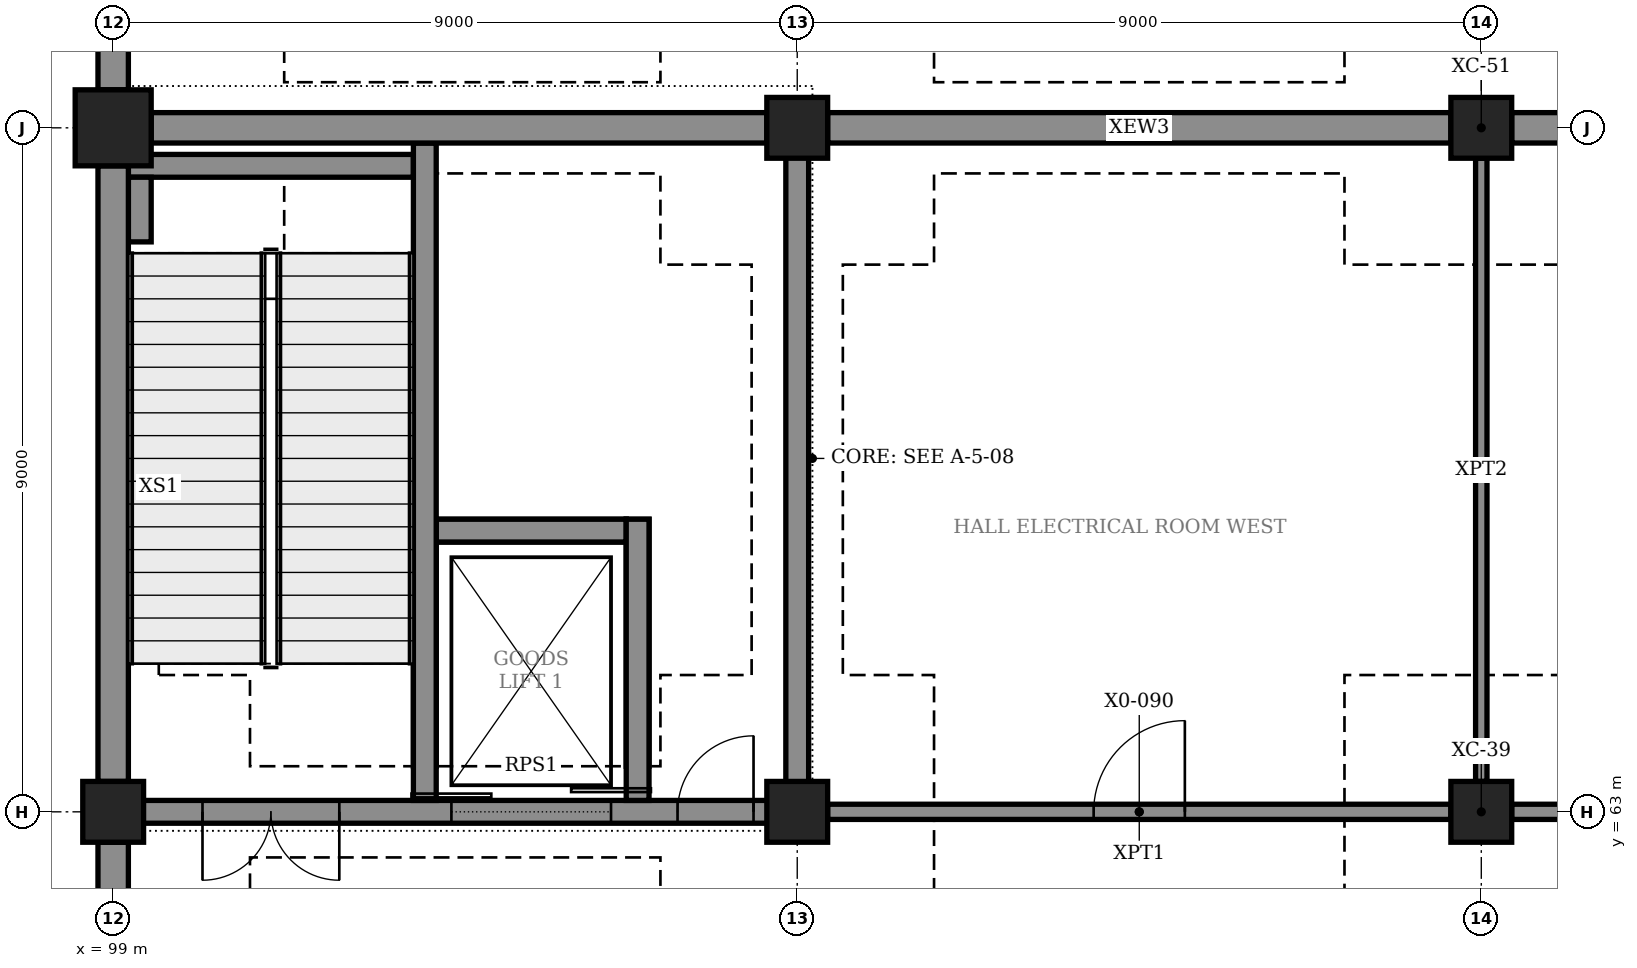
"""IFC4 building model, lengths in metres.
Left out: names, types, materials, properties, quantities, classifications, styles, units other than length and angle.
Written with IfcOpenShell. Run it as: python <this file> out.ifc"""

import sys

from ifc_helpers import new_model, si_unit, direction, frame, frame_2d, origin, origin_2d, place, context, subcontext, project, spatial, rectangle, hollow_rectangle, extrude, element, fill, save


model = new_model("IFC4")
c1 = context("Model", 3, precision=1e-05, world=origin(), true_north=direction((0.0, 1.0)))
c2 = subcontext(c1, "Body", "Model", "MODEL_VIEW")
j1 = project(units=[si_unit("LENGTHUNIT", "METRE"), si_unit("PLANEANGLEUNIT", "RADIAN")], contexts=[c1])
p1 = place(None, origin())
s1 = spatial("IfcSite", under=j1, at=p1, CompositionType="ELEMENT")
p2 = place(p1, origin())
s2 = spatial("IfcBuilding", under=s1, at=p2, CompositionType="ELEMENT")
p3 = place(p2, origin())
s3 = spatial("IfcBuildingStorey", under=s2, at=p3, CompositionType="ELEMENT", Elevation=0.0)
p4 = place(p3, frame((99.0, 72.0, 0.0), z_axis=(0.0, 0.0, 1.0), x_axis=(1.0, 0.0, 0.0)))
e1 = element("IfcColumn", 1, at=p4, inside=s3, PredefinedType="COLUMN", context=c2, shape_type="SweptSolid", body=[
    extrude(hollow_rectangle(XDim=1.0, YDim=1.0, WallThickness=0.032, at=origin_2d()), origin(), (0.0, 0.0, 1.0), 6.0),
])
for number, where, z_axis, x_axis in (
    (2, (99.0, 63.0, 0.0), (0.0, 0.0, 1.0), (1.0, 0.0, 0.0)),
    (3, (108.0, 63.0, 0.0), (0.0, 0.0, 1.0), (1.0, 0.0, 0.0)),
    (4, (117.0, 63.0, 0.0), (0.0, 0.0, 1.0), (1.0, 0.0, 0.0)),
    (5, (108.0, 72.0, 0.0), (0.0, 0.0, 1.0), (1.0, 0.0, 0.0)),
    (6, (117.0, 72.0, 0.0), (0.0, 0.0, 1.0), (1.0, 0.0, 0.0)),
):
    element("IfcColumn", number, at=place(p3, frame(where, z_axis=z_axis, x_axis=x_axis)), inside=s3, PredefinedType="COLUMN", context=c2, shape_type="SweptSolid", body=[
        extrude(rectangle(XDim=0.8, YDim=0.8, at=origin_2d()), origin(), (0.0, 0.0, 1.0), 6.0),
    ])
p5 = place(p3, frame((99.2, 63.0, 0.0), z_axis=(0.0, 0.0, 1.0), x_axis=(1.0, 0.0, 0.0)))
e7 = element("IfcWall", 7, at=p5, inside=s3, PredefinedType="SHEAR", context=c2, shape_type="SweptSolid", body=[
    extrude(rectangle(XDim=8.95, YDim=0.3, at=frame_2d((4.475, 0.0))), origin(), (0.0, 0.0, 1.0), 6.0),
])
p6 = place(p5, frame((0.975, 0.0, 0.0)))
e8 = element("IfcOpeningElement", 8, at=p6, cuts=e7, PredefinedType="OPENING", context=c2, shape_type="SweptSolid", body=[
    extrude(rectangle(XDim=1.8, YDim=2.4, at=frame_2d((0.9, 1.2))), frame((0.0, 0.16, 0.0), z_axis=(0.0, -1.0, 0.0), x_axis=(1.0, 0.0, 0.0)), (0.0, 0.0, 1.0), 0.32),
])
p7 = place(p5, frame((4.25, 0.0, 0.0)))
e9 = element("IfcOpeningElement", 9, at=p7, cuts=e7, PredefinedType="OPENING", context=c2, shape_type="SweptSolid", body=[
    extrude(rectangle(XDim=2.1, YDim=2.4, at=frame_2d((1.05, 1.2))), frame((0.0, 0.16, 0.0), z_axis=(0.0, -1.0, 0.0), x_axis=(1.0, 0.0, 0.0)), (0.0, 0.0, 1.0), 0.32),
])
p8 = place(p5, frame((7.225, 0.0, 0.0)))
e10 = element("IfcOpeningElement", 10, at=p8, cuts=e7, PredefinedType="OPENING", context=c2, shape_type="SweptSolid", body=[
    extrude(rectangle(XDim=1.0, YDim=2.4, at=frame_2d((0.5, 1.2))), frame((0.0, 0.16, 0.0), z_axis=(0.0, -1.0, 0.0), x_axis=(1.0, 0.0, 0.0)), (0.0, 0.0, 1.0), 0.32),
])
p9 = place(p3, frame((108.0, 63.15, 0.0), z_axis=(0.0, 0.0, 1.0), x_axis=(0.0, 1.0, 0.0)))
e11 = element("IfcWall", 11, at=p9, inside=s3, PredefinedType="SHEAR", context=c2, shape_type="SweptSolid", body=[
    extrude(rectangle(XDim=8.65, YDim=0.3, at=frame_2d((4.325, 0.0))), origin(), (0.0, 0.0, 1.0), 6.0),
])
p10 = place(p3, frame((99.0, 54.5, 0.0), z_axis=(0.0, 0.0, 1.0), x_axis=(0.0, 1.0, 0.0)))
e12 = element("IfcWall", 12, at=p10, inside=s3, PredefinedType="SOLIDWALL", context=c2, shape_type="SweptSolid", body=[
    extrude(rectangle(XDim=8.1, YDim=0.4, at=frame_2d((4.05, 0.0))), origin(), (0.0, 0.0, 1.0), 4.92),
])
p11 = place(p10, frame((2.95, 0.0, 0.0)))
e13 = element("IfcOpeningElement", 13, at=p11, cuts=e12, PredefinedType="OPENING", context=c2, shape_type="SweptSolid", body=[
    extrude(rectangle(XDim=2.1, YDim=2.4, at=frame_2d((1.05, 1.2))), frame((0.0, 0.21, 0.0), z_axis=(0.0, -1.0, 0.0), x_axis=(1.0, 0.0, 0.0)), (0.0, 0.0, 1.0), 0.42),
])
p12 = place(p3, frame((99.0, 63.4, 0.0), z_axis=(0.0, 0.0, 1.0), x_axis=(0.0, 1.0, 0.0)))
e14 = element("IfcWall", 14, at=p12, inside=s3, PredefinedType="SOLIDWALL", context=c2, shape_type="SweptSolid", body=[
    extrude(rectangle(XDim=8.1, YDim=0.4, at=frame_2d((4.05, 0.0))), origin(), (0.0, 0.0, 1.0), 4.92),
])
p13 = place(p3, frame((99.0, 72.5, 0.0), z_axis=(0.0, 0.0, 1.0), x_axis=(0.0, 1.0, 0.0)))
e15 = element("IfcWall", 15, at=p13, inside=s3, PredefinedType="SOLIDWALL", context=c2, shape_type="SweptSolid", body=[
    extrude(rectangle(XDim=17.0, YDim=0.4, at=frame_2d((8.5, 0.0))), origin(), (0.0, 0.0, 1.0), 6.0),
])
p14 = place(p13, frame((3.15, 0.0, 0.0)))
e16 = element("IfcOpeningElement", 16, at=p14, cuts=e15, PredefinedType="OPENING", context=c2, shape_type="SweptSolid", body=[
    extrude(rectangle(XDim=2.7, YDim=2.4, at=frame_2d((1.35, 1.2))), frame((0.0, 0.21, 0.0), z_axis=(0.0, -1.0, 0.0), x_axis=(1.0, 0.0, 0.0)), (0.0, 0.0, 1.0), 0.42),
])
p15 = place(p13, frame((11.15, 0.0, 0.0)))
e17 = element("IfcOpeningElement", 17, at=p15, cuts=e15, PredefinedType="OPENING", context=c2, shape_type="SweptSolid", body=[
    extrude(rectangle(XDim=2.7, YDim=2.4, at=frame_2d((1.35, 1.2))), frame((0.0, 0.21, 0.0), z_axis=(0.0, -1.0, 0.0), x_axis=(1.0, 0.0, 0.0)), (0.0, 0.0, 1.0), 0.42),
])
p16 = place(p3, frame((99.5, 72.0, 0.0), z_axis=(0.0, 0.0, 1.0), x_axis=(1.0, 0.0, 0.0)))
e18 = element("IfcWall", 18, at=p16, inside=s3, PredefinedType="SOLIDWALL", context=c2, shape_type="SweptSolid", body=[
    extrude(rectangle(XDim=8.1, YDim=0.4, at=frame_2d((4.05, 0.0))), origin(), (0.0, 0.0, 1.0), 4.82),
])
p17 = place(p3, frame((108.4, 72.0, 0.0), z_axis=(0.0, 0.0, 1.0), x_axis=(1.0, 0.0, 0.0)))
e19 = element("IfcWall", 19, at=p17, inside=s3, PredefinedType="SOLIDWALL", context=c2, shape_type="SweptSolid", body=[
    extrude(rectangle(XDim=8.2, YDim=0.4, at=frame_2d((4.1, 0.0))), origin(), (0.0, 0.0, 1.0), 4.82),
])
p18 = place(p3, frame((117.4, 72.0, 0.0), z_axis=(0.0, 0.0, 1.0), x_axis=(1.0, 0.0, 0.0)))
e20 = element("IfcWall", 20, at=p18, inside=s3, PredefinedType="SOLIDWALL", context=c2, shape_type="SweptSolid", body=[
    extrude(rectangle(XDim=8.6, YDim=0.4, at=frame_2d((4.3, 0.0))), origin(), (0.0, 0.0, 1.0), 4.82),
])
p19 = place(p3, frame((99.2, 71.5, 0.0), z_axis=(0.0, 0.0, 1.0), x_axis=(1.0, 0.0, 0.0)))
e21 = element("IfcWall", 21, at=p19, inside=s3, PredefinedType="SHEAR", context=c2, shape_type="SweptSolid", body=[
    extrude(rectangle(XDim=3.75, YDim=0.3, at=frame_2d((1.875, 0.0))), origin(), (0.0, 0.0, 1.0), 2.8),
])
p20 = place(p3, frame((99.35, 70.499, 0.0), z_axis=(0.0, 0.0, 1.0), x_axis=(0.0, 1.0, 0.0)))
e22 = element("IfcWall", 22, at=p20, inside=s3, PredefinedType="SHEAR", context=c2, shape_type="SweptSolid", body=[
    extrude(rectangle(XDim=0.851, YDim=0.3, at=frame_2d((0.425, 0.0))), origin(), (0.0, 0.0, 1.0), 2.8),
])
p21 = place(p3, frame((103.1, 63.15, 0.0), z_axis=(0.0, 0.0, 1.0), x_axis=(0.0, 1.0, 0.0)))
e23 = element("IfcWall", 23, at=p21, inside=s3, PredefinedType="SHEAR", context=c2, shape_type="SweptSolid", body=[
    extrude(rectangle(XDim=8.65, YDim=0.3, at=frame_2d((4.325, 0.0))), origin(), (0.0, 0.0, 1.0), 5.72),
])
p22 = place(p3, frame((105.9, 63.15, 0.0), z_axis=(0.0, 0.0, 1.0), x_axis=(0.0, 1.0, 0.0)))
e24 = element("IfcWall", 24, at=p22, inside=s3, PredefinedType="SHEAR", context=c2, shape_type="SweptSolid", body=[
    extrude(rectangle(XDim=3.7, YDim=0.3, at=frame_2d((1.85, 0.0))), origin(), (0.0, 0.0, 1.0), 5.72),
])
p23 = place(p3, frame((103.25, 66.7, 0.0), z_axis=(0.0, 0.0, 1.0), x_axis=(1.0, 0.0, 0.0)))
e25 = element("IfcWall", 25, at=p23, inside=s3, PredefinedType="SHEAR", context=c2, shape_type="SweptSolid", body=[
    extrude(rectangle(XDim=2.5, YDim=0.3, at=frame_2d((1.25, 0.0))), origin(), (0.0, 0.0, 1.0), 5.72),
])
for number, where, z_axis, x_axis in (
    (26, (103.1, 63.6, -1.4), (0.0, 0.0, 1.0), (0.0, 1.0, 0.0)),
    (27, (105.9, 63.6, -1.4), (0.0, 0.0, 1.0), (0.0, 1.0, 0.0)),
):
    element("IfcWall", number, at=place(p3, frame(where, z_axis=z_axis, x_axis=x_axis)), inside=s3, PredefinedType="SHEAR", context=c2, shape_type="SweptSolid", body=[
        extrude(rectangle(XDim=3.25, YDim=0.3, at=frame_2d((1.625, 0.0))), origin(), (0.0, 0.0, 1.0), 1.4),
    ])
p24 = place(p3, frame((103.25, 66.7, -1.4), z_axis=(0.0, 0.0, 1.0), x_axis=(1.0, 0.0, 0.0)))
e28 = element("IfcWall", 28, at=p24, inside=s3, PredefinedType="SHEAR", context=c2, shape_type="SweptSolid", body=[
    extrude(rectangle(XDim=2.5, YDim=0.3, at=frame_2d((1.25, 0.0))), origin(), (0.0, 0.0, 1.0), 1.4),
])
p25 = place(p3, frame((108.4, 63.0, 0.0), z_axis=(0.0, 0.0, 1.0), x_axis=(1.0, 0.0, 0.0)))
e29 = element("IfcWall", 29, at=p25, inside=s3, PredefinedType="PARTITIONING", context=c2, shape_type="SweptSolid", body=[
    extrude(rectangle(XDim=8.2, YDim=0.2, at=frame_2d((4.1, 0.0))), origin(), (0.0, 0.0, 1.0), 4.82),
])
p26 = place(p25, frame((3.5, 0.0, 0.015)))
e30 = element("IfcOpeningElement", 30, at=p26, cuts=e29, PredefinedType="OPENING", context=c2, shape_type="SweptSolid", body=[
    extrude(rectangle(XDim=1.2, YDim=2.4, at=frame_2d((0.6, 1.2))), frame((0.0, 0.11, 0.0), z_axis=(0.0, -1.0, 0.0), x_axis=(1.0, 0.0, 0.0)), (0.0, 0.0, 1.0), 0.22),
])
p27 = place(p3, frame((117.4, 63.0, 0.0), z_axis=(0.0, 0.0, 1.0), x_axis=(1.0, 0.0, 0.0)))
e31 = element("IfcWall", 31, at=p27, inside=s3, PredefinedType="PARTITIONING", context=c2, shape_type="SweptSolid", body=[
    extrude(rectangle(XDim=8.45, YDim=0.2, at=frame_2d((4.225, 0.0))), origin(), (0.0, 0.0, 1.0), 4.82),
])
p28 = place(p27, frame((3.625, 0.0, 0.015)))
e32 = element("IfcOpeningElement", 32, at=p28, cuts=e31, PredefinedType="OPENING", context=c2, shape_type="SweptSolid", body=[
    extrude(rectangle(XDim=1.2, YDim=2.4, at=frame_2d((0.6, 1.2))), frame((0.0, 0.11, 0.0), z_axis=(0.0, -1.0, 0.0), x_axis=(1.0, 0.0, 0.0)), (0.0, 0.0, 1.0), 0.22),
])
p29 = place(p3, frame((117.0, 63.4, 0.0), z_axis=(0.0, 0.0, 1.0), x_axis=(0.0, 1.0, 0.0)))
e33 = element("IfcWall", 33, at=p29, inside=s3, PredefinedType="PARTITIONING", context=c2, shape_type="SweptSolid", body=[
    extrude(rectangle(XDim=8.2, YDim=0.15, at=frame_2d((4.1, 0.0))), origin(), (0.0, 0.0, 1.0), 4.92),
])
p30 = place(p26, origin())
e34 = element("IfcDoor", 34, at=p30, inside=s3, OperationType="SINGLE_SWING_RIGHT", PredefinedType="DOOR", context=c2, shape_type="SweptSolid", body=[
    extrude(rectangle(XDim=1.2, YDim=2.4, at=frame_2d((0.6, 1.2))), frame((0.0, 0.025, 0.0), z_axis=(0.0, -1.0, 0.0), x_axis=(1.0, 0.0, 0.0)), (0.0, 0.0, 1.0), 0.05),
])
fill(e30, e34)
p31 = place(p6, frame((1.8, 0.0, 0.0), z_axis=(0.0, 0.0, 1.0), x_axis=(-1.0, 0.0, 0.0)))
e35 = element("IfcDoor", 35, at=p31, inside=s3, OperationType="DOUBLE_DOOR_SINGLE_SWING", PredefinedType="DOOR", context=c2, shape_type="SweptSolid", body=[
    extrude(rectangle(XDim=1.8, YDim=2.4, at=frame_2d((0.9, 1.2))), frame((0.0, 0.025, 0.0), z_axis=(0.0, -1.0, 0.0), x_axis=(1.0, 0.0, 0.0)), (0.0, 0.0, 1.0), 0.05),
])
fill(e8, e35)
p32 = place(p7, origin())
e36 = element("IfcDoor", 36, at=p32, inside=s3, OperationType="DOUBLE_DOOR_SLIDING", PredefinedType="DOOR", context=c2, shape_type="SweptSolid", body=[
    extrude(rectangle(XDim=2.1, YDim=2.4, at=frame_2d((1.05, 1.2))), frame((0.0, 0.025, 0.0), z_axis=(0.0, -1.0, 0.0), x_axis=(1.0, 0.0, 0.0)), (0.0, 0.0, 1.0), 0.05),
])
fill(e9, e36)
p33 = place(p8, origin())
e37 = element("IfcDoor", 37, at=p33, inside=s3, OperationType="SINGLE_SWING_RIGHT", PredefinedType="DOOR", context=c2, shape_type="SweptSolid", body=[
    extrude(rectangle(XDim=1.0, YDim=2.4, at=frame_2d((0.5, 1.2))), frame((0.0, 0.025, 0.0), z_axis=(0.0, -1.0, 0.0), x_axis=(1.0, 0.0, 0.0)), (0.0, 0.0, 1.0), 0.05),
])
fill(e10, e37)
save(model, sys.argv[1])
